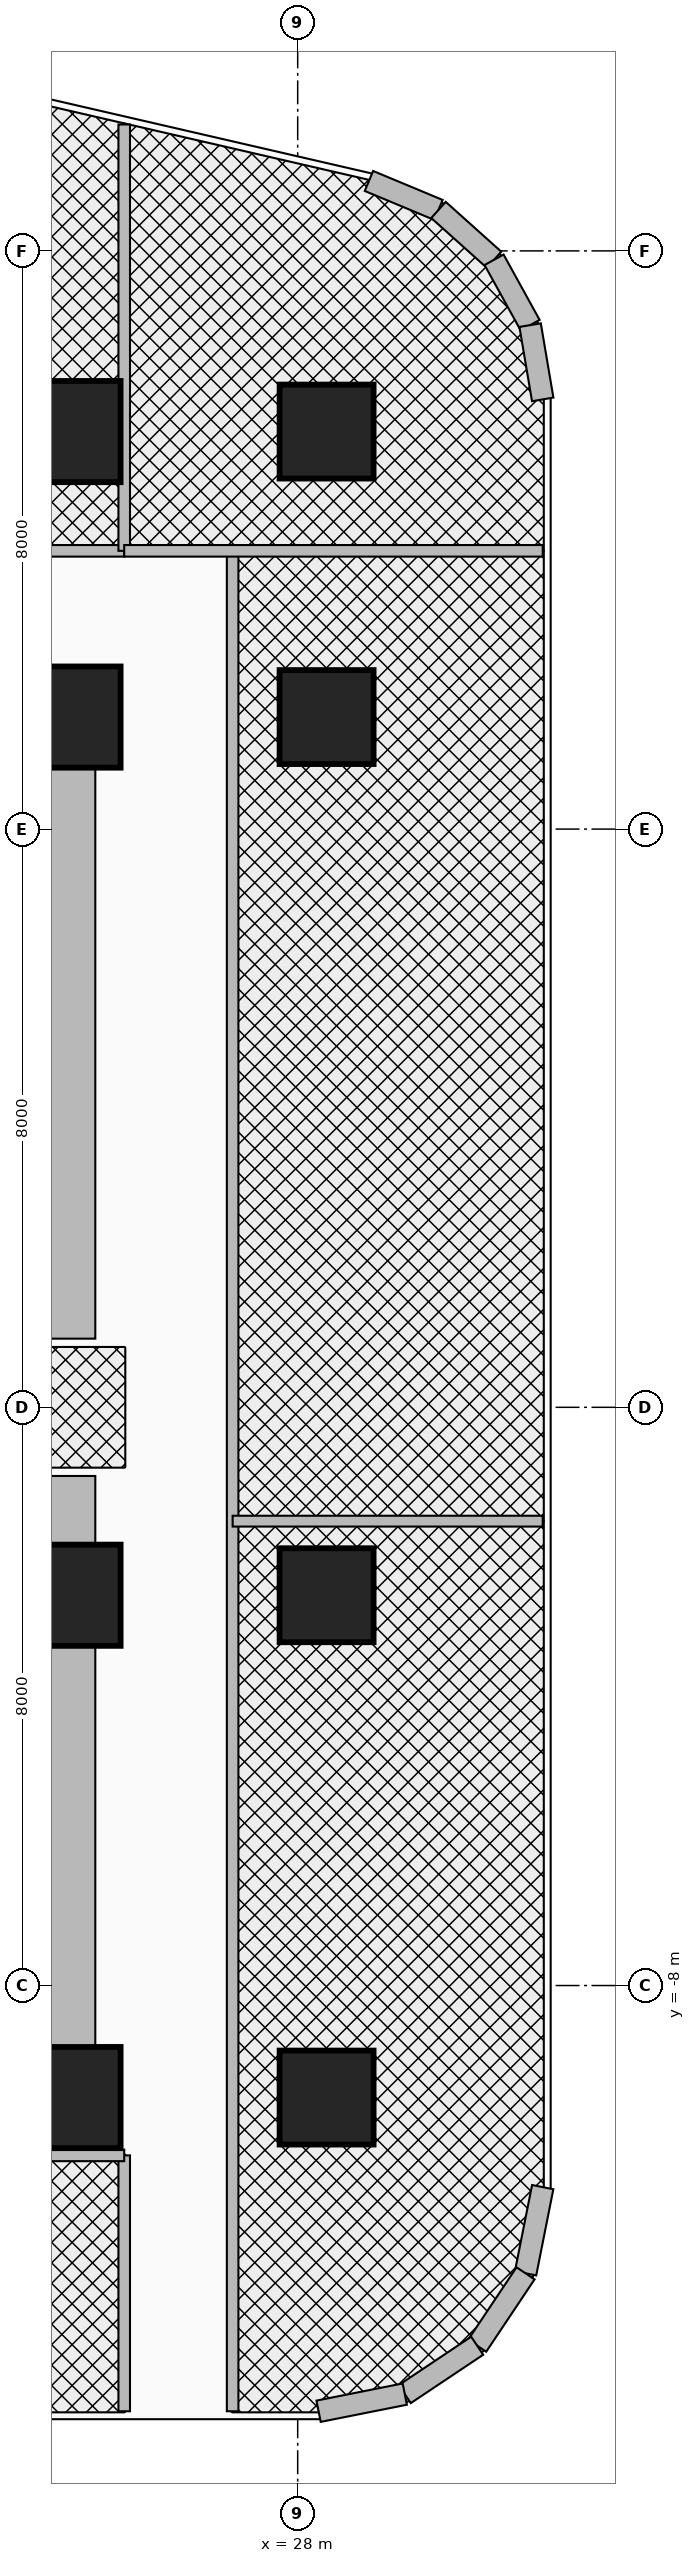
"""IFC4 building model, lengths in metres.
Left out: names, types, materials, properties, quantities, classifications, styles, units other than length and angle.
Written with IfcOpenShell. Run it as: python <this file> out.ifc"""

import sys

from ifc_helpers import new_model, si_unit, direction, frame, frame_2d, origin, origin_2d, place, context, subcontext, project, spatial, rectangle, circle, extrude, source, transform, mapped, element, fill, save


model = new_model("IFC4")
c1 = context("Model", 3, precision=1e-05, world=origin(), true_north=direction((0.0, 1.0)))
c2 = subcontext(c1, "Body", "Model", "MODEL_VIEW")
j1 = project(units=[si_unit("LENGTHUNIT", "METRE"), si_unit("PLANEANGLEUNIT", "RADIAN")], contexts=[c1])
p1 = place(None, origin())
s1 = spatial("IfcSite", under=j1, at=p1, CompositionType="ELEMENT")
p2 = place(p1, origin())
s2 = spatial("IfcBuilding", under=s1, at=p2, CompositionType="ELEMENT")
p3 = place(p2, frame((0.0, 0.0, 48.2)))
s3 = spatial("IfcBuildingStorey", under=s2, at=p3, CompositionType="ELEMENT", Elevation=48.2)
for number, where, z_axis, x_axis in (
    (1, (24.85, -9.9, 0.0), (0.0, 0.0, 1.0), (0.0, 1.0, 0.0)),
    (2, (24.85, 0.95, 0.0), (0.0, 0.0, 1.0), (0.0, 1.0, 0.0)),
):
    element("IfcWall", number, at=place(p3, frame(where, z_axis=z_axis, x_axis=x_axis)), inside=s3, PredefinedType="SHEAR", context=c2, shape_type="SweptSolid", body=[
        extrude(rectangle(XDim=8.95, YDim=0.7, at=frame_2d((4.475, 0.0))), origin(), (0.0, 0.0, 1.0), 3.46),
    ])
for number, where, z_axis, x_axis in (
    (3, (15.85, 9.55, 0.0), (0.0, 0.0, 1.0), (1.0, 0.0, 0.0)),
    (4, (15.85, -9.55, 0.0), (0.0, 0.0, 1.0), (1.0, 0.0, 0.0)),
):
    element("IfcWall", number, at=place(p3, frame(where, z_axis=z_axis, x_axis=x_axis)), inside=s3, PredefinedType="SHEAR", context=c2, shape_type="SweptSolid", body=[
        extrude(rectangle(XDim=9.0, YDim=0.7, at=frame_2d((4.5, 0.0))), origin(), (0.0, 0.0, 1.0), 3.46),
    ])
m1 = source(origin(), c2, "Body", "SweptSolid", [
    extrude(rectangle(XDim=1.4, YDim=1.4, at=origin_2d()), origin(), (0.0, 0.0, 1.0), 3.7),
])
p4 = place(p3, frame((24.85, -9.55, 0.0), z_axis=(0.0, 0.0, 1.0), x_axis=(1.0, 0.0, 0.0)))
e5 = element("IfcColumn", 5, at=p4, inside=s3, PredefinedType="COLUMN", context=c2, shape_type="MappedRepresentation", body=[
    mapped(m1, transform((0.0, 0.0, 0.0), x_axis=(1.0, 0.0, 0.0), y_axis=(0.0, 1.0, 0.0), z_axis=(0.0, 0.0, 1.0), scale=1.0)),
])
m2 = source(origin(), c2, "Body", "SweptSolid", [
    extrude(circle(Radius=0.65, at=origin_2d()), origin(), (0.0, 0.0, 1.0), 3.7),
])
p5 = place(p3, frame((28.4, -9.55, 0.0), z_axis=(0.0, 0.0, 1.0), x_axis=(1.0, 0.0, 0.0)))
e6 = element("IfcColumn", 6, at=p5, inside=s3, PredefinedType="COLUMN", context=c2, shape_type="MappedRepresentation", body=[
    mapped(m2, transform((0.0, 0.0, 0.0), x_axis=(1.0, 0.0, 0.0), y_axis=(0.0, 1.0, 0.0), z_axis=(0.0, 0.0, 1.0), scale=1.0)),
])
p6 = place(p3, frame((24.85, -2.6, 0.0), z_axis=(0.0, 0.0, 1.0), x_axis=(1.0, 0.0, 0.0)))
e7 = element("IfcColumn", 7, at=p6, inside=s3, PredefinedType="COLUMN", context=c2, shape_type="MappedRepresentation", body=[
    mapped(m1, transform((0.0, 0.0, 0.0), x_axis=(1.0, 0.0, 0.0), y_axis=(0.0, 1.0, 0.0), z_axis=(0.0, 0.0, 1.0), scale=1.0)),
])
p7 = place(p3, frame((28.4, -2.6, 0.0), z_axis=(0.0, 0.0, 1.0), x_axis=(1.0, 0.0, 0.0)))
e8 = element("IfcColumn", 8, at=p7, inside=s3, PredefinedType="COLUMN", context=c2, shape_type="MappedRepresentation", body=[
    mapped(m2, transform((0.0, 0.0, 0.0), x_axis=(1.0, 0.0, 0.0), y_axis=(0.0, 1.0, 0.0), z_axis=(0.0, 0.0, 1.0), scale=1.0)),
])
p8 = place(p3, frame((24.85, 9.55, 0.0), z_axis=(0.0, 0.0, 1.0), x_axis=(1.0, 0.0, 0.0)))
e9 = element("IfcColumn", 9, at=p8, inside=s3, PredefinedType="COLUMN", context=c2, shape_type="MappedRepresentation", body=[
    mapped(m1, transform((0.0, 0.0, 0.0), x_axis=(1.0, 0.0, 0.0), y_axis=(0.0, 1.0, 0.0), z_axis=(0.0, 0.0, 1.0), scale=1.0)),
])
p9 = place(p3, frame((28.4, 9.55, 0.0), z_axis=(0.0, 0.0, 1.0), x_axis=(1.0, 0.0, 0.0)))
e10 = element("IfcColumn", 10, at=p9, inside=s3, PredefinedType="COLUMN", context=c2, shape_type="MappedRepresentation", body=[
    mapped(m2, transform((0.0, 0.0, 0.0), x_axis=(1.0, 0.0, 0.0), y_axis=(0.0, 1.0, 0.0), z_axis=(0.0, 0.0, 1.0), scale=1.0)),
])
p10 = place(p3, frame((24.85, 13.5, 0.0), z_axis=(0.0, 0.0, 1.0), x_axis=(1.0, 0.0, 0.0)))
e11 = element("IfcColumn", 11, at=p10, inside=s3, PredefinedType="COLUMN", context=c2, shape_type="MappedRepresentation", body=[
    mapped(m1, transform((0.0, 0.0, 0.0), x_axis=(1.0, 0.0, 0.0), y_axis=(0.0, 1.0, 0.0), z_axis=(0.0, 0.0, 1.0), scale=1.0)),
])
p11 = place(p3, frame((28.4, 13.5, 0.0), z_axis=(0.0, 0.0, 1.0), x_axis=(1.0, 0.0, 0.0)))
e12 = element("IfcColumn", 12, at=p11, inside=s3, PredefinedType="COLUMN", context=c2, shape_type="MappedRepresentation", body=[
    mapped(m2, transform((0.0, 0.0, 0.0), x_axis=(1.0, 0.0, 0.0), y_axis=(0.0, 1.0, 0.0), z_axis=(0.0, 0.0, 1.0), scale=1.0)),
])
p12 = place(p3, frame((28.986, 16.967, 0.0), z_axis=(0.0, 0.0, 1.0), x_axis=(0.923083852684, -0.384598753136, 0.0)))
e13 = element("IfcWall", 13, at=p12, inside=s3, PredefinedType="SOLIDWALL", context=c2, shape_type="SweptSolid", body=[
    extrude(rectangle(XDim=1.042, YDim=0.3, at=frame_2d((0.521, 0.0))), origin(), (0.0, 0.0, 1.0), 3.46),
])
p13 = place(p3, frame((29.948, 16.566, 0.0), z_axis=(0.0, 0.0, 1.0), x_axis=(0.744585645533, -0.66752694063, 0.0)))
e14 = element("IfcWall", 14, at=p13, inside=s3, PredefinedType="SOLIDWALL", context=c2, shape_type="SweptSolid", body=[
    extrude(rectangle(XDim=1.033, YDim=0.3, at=frame_2d((0.517, 0.0))), origin(), (0.0, 0.0, 1.0), 3.46),
])
p14 = place(p3, frame((30.717, 15.877, 0.0), z_axis=(0.0, 0.0, 1.0), x_axis=(0.482971098131, -0.875636293429, 0.0)))
e15 = element("IfcWall", 15, at=p14, inside=s3, PredefinedType="SOLIDWALL", context=c2, shape_type="SweptSolid", body=[
    extrude(rectangle(XDim=1.033, YDim=0.3, at=frame_2d((0.516, 0.0))), origin(), (0.0, 0.0, 1.0), 3.46),
])
p15 = place(p3, frame((31.216, 14.973, 0.0), z_axis=(0.0, 0.0, 1.0), x_axis=(0.167019462117, -0.985953598946, 0.0)))
e16 = element("IfcWall", 16, at=p15, inside=s3, PredefinedType="SOLIDWALL", context=c2, shape_type="SweptSolid", body=[
    extrude(rectangle(XDim=1.042, YDim=0.3, at=frame_2d((0.521, 0.0))), origin(), (0.0, 0.0, 1.0), 3.46),
])
p16 = place(p3, frame((31.39, -10.789, 0.0), z_axis=(0.0, 0.0, 1.0), x_axis=(-0.194996050505, -0.980804027463, 0.0)))
e17 = element("IfcWall", 17, at=p16, inside=s3, PredefinedType="SOLIDWALL", context=c2, shape_type="SweptSolid", body=[
    extrude(rectangle(XDim=1.216, YDim=0.3, at=frame_2d((0.608, 0.0))), origin(), (0.0, 0.0, 1.0), 3.46),
])
for number, where, z_axis, x_axis in (
    (18, (31.153, -11.982, 0.0), (0.0, 0.0, 1.0), (-0.556, -0.831, 0.0)),
    (19, (30.483, -12.983, 0.0), (0.0, 0.0, 1.0), (-0.831, -0.556, 0.0)),
):
    element("IfcWall", number, at=place(p3, frame(where, z_axis=z_axis, x_axis=x_axis)), inside=s3, PredefinedType="SOLIDWALL", context=c2, shape_type="SweptSolid", body=[
        extrude(rectangle(XDim=1.205, YDim=0.3, at=frame_2d((0.603, 0.0))), origin(), (0.0, 0.0, 1.0), 3.46),
    ])
p17 = place(p3, frame((29.482, -13.653, 0.0), z_axis=(0.0, 0.0, 1.0), x_axis=(-0.980804027463, -0.194996050505, 0.0)))
e20 = element("IfcWall", 20, at=p17, inside=s3, PredefinedType="SOLIDWALL", context=c2, shape_type="SweptSolid", body=[
    extrude(rectangle(XDim=1.216, YDim=0.3, at=frame_2d((0.608, 0.0))), origin(), (0.0, 0.0, 1.0), 3.46),
])
p18 = place(p3, frame((15.4, 11.85, 0.0), z_axis=(0.0, 0.0, 1.0), x_axis=(1.0, 0.0, 0.0)))
e21 = element("IfcWall", 21, at=p18, inside=s3, PredefinedType="PARTITIONING", context=c2, shape_type="SweptSolid", body=[
    extrude(rectangle(XDim=10.2, YDim=0.16, at=frame_2d((5.1, 0.0))), origin(), (0.0, 0.0, 1.0), 2.834),
])
p19 = place(p18, frame((4.65, 0.0, 0.0)))
e22 = element("IfcOpeningElement", 22, at=p19, cuts=e21, PredefinedType="OPENING", context=c2, shape_type="SweptSolid", body=[
    extrude(rectangle(XDim=0.9, YDim=2.1, at=frame_2d((0.45, 1.05))), frame((0.0, 0.095, 0.0), z_axis=(0.0, -1.0, 0.0), x_axis=(1.0, 0.0, 0.0)), (0.0, 0.0, 1.0), 0.19),
])
p20 = place(p3, frame((25.6, 11.85, 0.0), z_axis=(0.0, 0.0, 1.0), x_axis=(0.0, 1.0, 0.0)))
e23 = element("IfcWall", 23, at=p20, inside=s3, PredefinedType="PARTITIONING", context=c2, shape_type="SweptSolid", body=[
    extrude(rectangle(XDim=5.898, YDim=0.16, at=frame_2d((2.949, 0.0))), origin(), (0.0, 0.0, 1.0), 2.583),
])
p21 = place(p3, frame((25.6, -13.89, 0.0), z_axis=(0.0, 0.0, 1.0), x_axis=(0.0, 1.0, 0.0)))
e24 = element("IfcWall", 24, at=p21, inside=s3, PredefinedType="PARTITIONING", context=c2, shape_type="SweptSolid", body=[
    extrude(rectangle(XDim=3.54, YDim=0.16, at=frame_2d((1.77, 0.0))), origin(), (0.0, 0.0, 1.0), 3.46),
])
p22 = place(p21, frame((1.32, 0.0, 0.0)))
e25 = element("IfcOpeningElement", 25, at=p22, cuts=e24, PredefinedType="OPENING", context=c2, shape_type="SweptSolid", body=[
    extrude(rectangle(XDim=0.9, YDim=2.1, at=frame_2d((0.45, 1.05))), frame((0.0, 0.095, 0.0), z_axis=(0.0, -1.0, 0.0), x_axis=(1.0, 0.0, 0.0)), (0.0, 0.0, 1.0), 0.19),
])
p23 = place(p3, frame((13.41, -10.35, 0.0), z_axis=(0.0, 0.0, 1.0), x_axis=(1.0, 0.0, 0.0)))
e26 = element("IfcWall", 26, at=p23, inside=s3, PredefinedType="PARTITIONING", context=c2, shape_type="SweptSolid", body=[
    extrude(rectangle(XDim=12.19, YDim=0.16, at=frame_2d((6.095, 0.0))), origin(), (0.0, 0.0, 1.0), 3.46),
])
p24 = place(p3, frame((27.1, -13.89, 0.0), z_axis=(0.0, 0.0, 1.0), x_axis=(0.0, 1.0, 0.0)))
e27 = element("IfcWall", 27, at=p24, inside=s3, PredefinedType="PARTITIONING", context=c2, shape_type="SweptSolid", body=[
    extrude(rectangle(XDim=25.74, YDim=0.16, at=frame_2d((12.87, 0.0))), origin(), (0.0, 0.0, 1.0), 2.583),
])
p25 = place(p24, frame((5.258, 0.0, 0.0)))
e28 = element("IfcOpeningElement", 28, at=p25, cuts=e27, PredefinedType="OPENING", context=c2, shape_type="SweptSolid", body=[
    extrude(rectangle(XDim=1.8, YDim=2.15, at=frame_2d((0.9, 1.075))), frame((0.0, 0.095, 0.0), z_axis=(0.0, -1.0, 0.0), x_axis=(1.0, 0.0, 0.0)), (0.0, 0.0, 1.0), 0.19),
])
p26 = place(p24, frame((18.128, 0.0, 0.0)))
e29 = element("IfcOpeningElement", 29, at=p26, cuts=e27, PredefinedType="OPENING", context=c2, shape_type="SweptSolid", body=[
    extrude(rectangle(XDim=1.8, YDim=2.15, at=frame_2d((0.9, 1.075))), frame((0.0, 0.095, 0.0), z_axis=(0.0, -1.0, 0.0), x_axis=(1.0, 0.0, 0.0)), (0.0, 0.0, 1.0), 0.19),
])
p27 = place(p3, frame((25.6, 11.85, 0.0), z_axis=(0.0, 0.0, 1.0), x_axis=(1.0, 0.0, 0.0)))
e30 = element("IfcWall", 30, at=p27, inside=s3, PredefinedType="PARTITIONING", context=c2, shape_type="SweptSolid", body=[
    extrude(rectangle(XDim=5.79, YDim=0.16, at=frame_2d((2.895, 0.0))), origin(), (0.0, 0.0, 1.0), 2.896),
])
p28 = place(p27, frame((0.3, 0.0, 0.0)))
e31 = element("IfcOpeningElement", 31, at=p28, cuts=e30, PredefinedType="OPENING", context=c2, shape_type="SweptSolid", body=[
    extrude(rectangle(XDim=0.9, YDim=2.1, at=frame_2d((0.45, 1.05))), frame((0.0, 0.095, 0.0), z_axis=(0.0, -1.0, 0.0), x_axis=(1.0, 0.0, 0.0)), (0.0, 0.0, 1.0), 0.19),
])
p29 = place(p3, frame((27.1, -1.575, 0.0), z_axis=(0.0, 0.0, 1.0), x_axis=(1.0, 0.0, 0.0)))
e32 = element("IfcWall", 32, at=p29, inside=s3, PredefinedType="PARTITIONING", context=c2, shape_type="SweptSolid", body=[
    extrude(rectangle(XDim=4.29, YDim=0.15, at=frame_2d((2.145, 0.0))), origin(), (0.0, 0.0, 1.0), 2.896),
])
p30 = place(p22, origin())
e33 = element("IfcDoor", 33, at=p30, inside=s3, OperationType="SINGLE_SWING_RIGHT", PredefinedType="DOOR", context=c2, shape_type="SweptSolid", body=[
    extrude(rectangle(XDim=0.9, YDim=2.1, at=frame_2d((0.45, 1.05))), frame((0.0, 0.025, 0.0), z_axis=(0.0, -1.0, 0.0), x_axis=(1.0, 0.0, 0.0)), (0.0, 0.0, 1.0), 0.05),
])
fill(e25, e33)
p31 = place(p28, origin())
e34 = element("IfcDoor", 34, at=p31, inside=s3, OperationType="SINGLE_SWING_LEFT", PredefinedType="DOOR", context=c2, shape_type="SweptSolid", body=[
    extrude(rectangle(XDim=0.9, YDim=2.1, at=frame_2d((0.45, 1.05))), frame((0.0, 0.025, 0.0), z_axis=(0.0, -1.0, 0.0), x_axis=(1.0, 0.0, 0.0)), (0.0, 0.0, 1.0), 0.05),
])
fill(e31, e34)
p32 = place(p25, origin())
e35 = element("IfcDoor", 35, at=p32, inside=s3, OperationType="DOUBLE_DOOR_SINGLE_SWING", PredefinedType="DOOR", context=c2, shape_type="SweptSolid", body=[
    extrude(rectangle(XDim=1.8, YDim=2.15, at=frame_2d((0.9, 1.075))), frame((0.0, 0.025, 0.0), z_axis=(0.0, -1.0, 0.0), x_axis=(1.0, 0.0, 0.0)), (0.0, 0.0, 1.0), 0.05),
])
fill(e28, e35)
p33 = place(p26, frame((1.8, 0.0, 0.0), z_axis=(0.0, 0.0, 1.0), x_axis=(-1.0, 0.0, 0.0)))
e36 = element("IfcDoor", 36, at=p33, inside=s3, OperationType="DOUBLE_DOOR_SINGLE_SWING", PredefinedType="DOOR", context=c2, shape_type="SweptSolid", body=[
    extrude(rectangle(XDim=1.8, YDim=2.15, at=frame_2d((0.9, 1.075))), frame((0.0, 0.025, 0.0), z_axis=(0.0, -1.0, 0.0), x_axis=(1.0, 0.0, 0.0)), (0.0, 0.0, 1.0), 0.05),
])
fill(e29, e36)
save(model, sys.argv[1])
